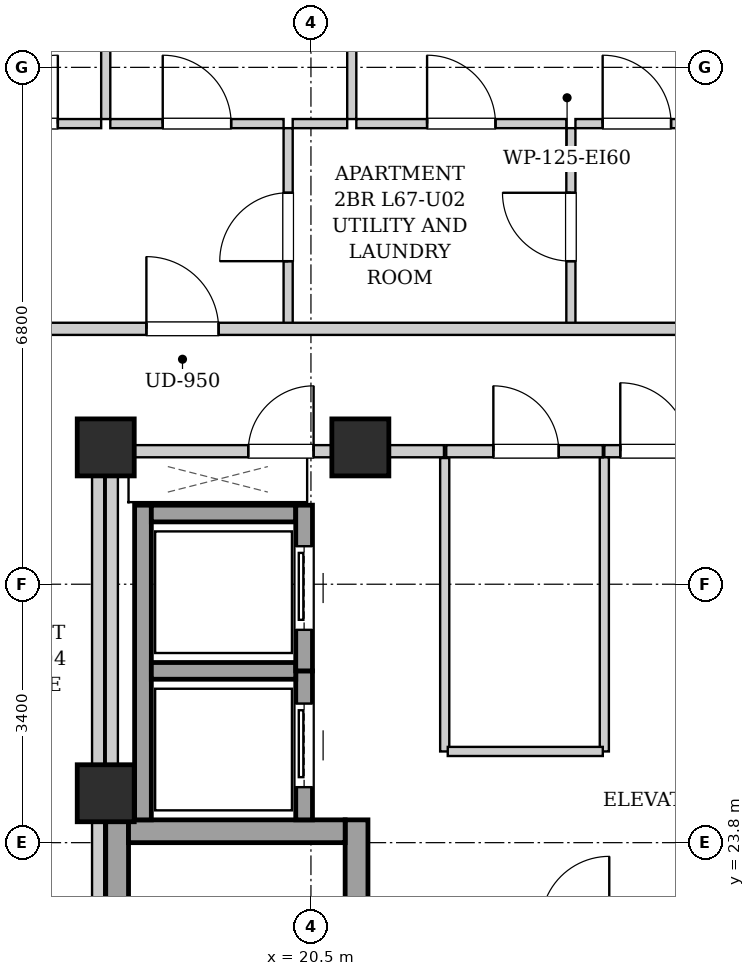
"""IFC4 building model, lengths in metres.
Left out: names, types, materials, properties, quantities, classifications, styles, units other than length and angle.
Written with IfcOpenShell. Run it as: python <this file> out.ifc"""

import sys

from ifc_helpers import new_model, si_unit, direction, frame, frame_2d, origin, origin_2d, place, context, subcontext, project, spatial, rectangle, extrude, element, fill, save


model = new_model("IFC4")
c1 = context("Model", 3, precision=1e-05, world=origin(), true_north=direction((0.0, 1.0)))
c2 = subcontext(c1, "Body", "Model", "MODEL_VIEW")
j1 = project(units=[si_unit("LENGTHUNIT", "METRE"), si_unit("PLANEANGLEUNIT", "RADIAN")], contexts=[c1])
p1 = place(None, origin())
s1 = spatial("IfcSite", under=j1, at=p1, CompositionType="ELEMENT")
p2 = place(p1, origin())
s2 = spatial("IfcBuilding", under=s1, at=p2, CompositionType="ELEMENT")
p3 = place(p2, frame((0.0, 0.0, 230.9)))
s3 = spatial("IfcBuildingStorey", under=s2, at=p3, CompositionType="ELEMENT", Elevation=230.9)
for number, where, z_axis, x_axis in (
    (1, (17.8, 29.0, 0.0), (0.0, 0.0, 1.0), (1.0, 0.0, 0.0)),
    (2, (21.15, 29.0, 0.0), (0.0, 0.0, 1.0), (1.0, 0.0, 0.0)),
    (3, (17.8, 24.45, 0.0), (0.0, 0.0, 1.0), (1.0, 0.0, 0.0)),
):
    element("IfcColumn", number, at=place(p3, frame(where, z_axis=z_axis, x_axis=x_axis)), inside=s3, PredefinedType="COLUMN", context=c2, shape_type="SweptSolid", body=[
        extrude(rectangle(XDim=0.75, YDim=0.75, at=origin_2d()), origin(), (0.0, 0.0, 1.0), 3.4),
    ])
for number, where, z_axis, x_axis in (
    (4, (17.95, 15.1, 0.0), (0.0, 0.0, 1.0), (0.0, 1.0, 0.0)),
    (5, (21.1, 15.1, 0.0), (0.0, 0.0, 1.0), (0.0, 1.0, 0.0)),
):
    element("IfcWall", number, at=place(p3, frame(where, z_axis=z_axis, x_axis=x_axis)), inside=s3, PredefinedType="SHEAR", context=c2, shape_type="SweptSolid", body=[
        extrude(rectangle(XDim=9.0, YDim=0.3, at=frame_2d((4.5, 0.0))), origin(), (0.0, 0.0, 1.0), 3.14),
    ])
p4 = place(p3, frame((18.1, 23.95, 0.0), z_axis=(0.0, 0.0, 1.0), x_axis=(1.0, 0.0, 0.0)))
e6 = element("IfcWall", 6, at=p4, inside=s3, PredefinedType="SHEAR", context=c2, shape_type="SweptSolid", body=[
    extrude(rectangle(XDim=2.85, YDim=0.3, at=frame_2d((1.425, 0.0))), origin(), (0.0, 0.0, 1.0), 3.14),
])
p5 = place(p3, frame((18.29, 24.1, 0.0), z_axis=(0.0, 0.0, 1.0), x_axis=(0.0, 1.0, 0.0)))
e7 = element("IfcWall", 7, at=p5, inside=s3, PredefinedType="SHEAR", context=c2, shape_type="SweptSolid", body=[
    extrude(rectangle(XDim=4.14, YDim=0.22, at=frame_2d((2.07, 0.0))), origin(), (0.0, 0.0, 1.0), 3.14),
])
p6 = place(p3, frame((20.41, 24.1, 0.0), z_axis=(0.0, 0.0, 1.0), x_axis=(0.0, 1.0, 0.0)))
e8 = element("IfcWall", 8, at=p6, inside=s3, PredefinedType="SHEAR", context=c2, shape_type="SweptSolid", body=[
    extrude(rectangle(XDim=1.96, YDim=0.22, at=frame_2d((0.98, 0.0))), origin(), (0.0, 0.0, 1.0), 3.14),
])
p7 = place(p6, frame((0.43, 0.0, 0.0)))
e9 = element("IfcOpeningElement", 9, at=p7, cuts=e8, PredefinedType="OPENING", context=c2, shape_type="SweptSolid", body=[
    extrude(rectangle(XDim=1.1, YDim=2.15, at=frame_2d((0.55, 1.075))), frame((0.0, 0.12, 0.0), z_axis=(0.0, -1.0, 0.0), x_axis=(1.0, 0.0, 0.0)), (0.0, 0.0, 1.0), 0.24),
])
for number, where, z_axis, x_axis in (
    (10, (18.4, 26.06, 0.0), (0.0, 0.0, 1.0), (1.0, 0.0, 0.0)),
    (11, (18.4, 28.13, 0.0), (0.0, 0.0, 1.0), (1.0, 0.0, 0.0)),
):
    element("IfcWall", number, at=place(p3, frame(where, z_axis=z_axis, x_axis=x_axis)), inside=s3, PredefinedType="SHEAR", context=c2, shape_type="SweptSolid", body=[
        extrude(rectangle(XDim=1.9, YDim=0.22, at=frame_2d((0.95, 0.0))), origin(), (0.0, 0.0, 1.0), 3.14),
    ])
p8 = place(p3, frame((20.41, 26.06, 0.0), z_axis=(0.0, 0.0, 1.0), x_axis=(0.0, 1.0, 0.0)))
e12 = element("IfcWall", 12, at=p8, inside=s3, PredefinedType="SHEAR", context=c2, shape_type="SweptSolid", body=[
    extrude(rectangle(XDim=2.18, YDim=0.22, at=frame_2d((1.09, 0.0))), origin(), (0.0, 0.0, 1.0), 3.14),
])
p9 = place(p8, frame((0.54, 0.0, 0.0)))
e13 = element("IfcOpeningElement", 13, at=p9, cuts=e12, PredefinedType="OPENING", context=c2, shape_type="SweptSolid", body=[
    extrude(rectangle(XDim=1.1, YDim=2.15, at=frame_2d((0.55, 1.075))), frame((0.0, 0.12, 0.0), z_axis=(0.0, -1.0, 0.0), x_axis=(1.0, 0.0, 0.0)), (0.0, 0.0, 1.0), 0.24),
])
p10 = place(p3, frame((17.88, 24.12, 0.0), z_axis=(0.0, 0.0, 1.0), x_axis=(0.0, 1.0, 0.0)))
e14 = element("IfcWall", 14, at=p10, inside=s3, PredefinedType="PARTITIONING", context=c2, shape_type="SweptSolid", body=[
    extrude(rectangle(XDim=4.76, YDim=0.16, at=frame_2d((2.38, 0.0))), origin(), (0.0, 0.0, 1.0), 3.14),
])
p11 = place(p3, frame((24.36, 28.95, 0.0), z_axis=(0.0, 0.0, 1.0), x_axis=(1.0, 0.0, 0.0)))
e15 = element("IfcWall", 15, at=p11, inside=s3, PredefinedType="PARTITIONING", context=c2, shape_type="SweptSolid", body=[
    extrude(rectangle(XDim=1.32, YDim=0.16, at=frame_2d((0.66, 0.0))), origin(), (0.0, 0.0, 1.0), 2.668),
])
p12 = place(p11, frame((0.21, 0.0, 0.0)))
e16 = element("IfcOpeningElement", 16, at=p12, cuts=e15, PredefinedType="OPENING", context=c2, shape_type="SweptSolid", body=[
    extrude(rectangle(XDim=0.9, YDim=2.05, at=frame_2d((0.45, 1.025))), frame((0.0, 0.09, 0.0), z_axis=(0.0, -1.0, 0.0), x_axis=(1.0, 0.0, 0.0)), (0.0, 0.0, 1.0), 0.18),
])
p13 = place(p3, frame((17.96, 28.95, 0.0), z_axis=(0.0, 0.0, 1.0), x_axis=(1.0, 0.0, 0.0)))
e17 = element("IfcWall", 17, at=p13, inside=s3, PredefinedType="PARTITIONING", context=c2, shape_type="SweptSolid", body=[
    extrude(rectangle(XDim=4.29, YDim=0.16, at=frame_2d((2.145, 0.0))), origin(), (0.0, 0.0, 1.0), 2.668),
])
p14 = place(p13, frame((1.715, 0.0, 0.0)))
e18 = element("IfcOpeningElement", 18, at=p14, cuts=e17, PredefinedType="OPENING", context=c2, shape_type="SweptSolid", body=[
    extrude(rectangle(XDim=0.86, YDim=2.05, at=frame_2d((0.43, 1.025))), frame((0.0, 0.09, 0.0), z_axis=(0.0, -1.0, 0.0), x_axis=(1.0, 0.0, 0.0)), (0.0, 0.0, 1.0), 0.18),
])
p15 = place(p3, frame((24.36, 25.0, 0.0), z_axis=(0.0, 0.0, 1.0), x_axis=(0.0, 1.0, 0.0)))
e19 = element("IfcWall", 19, at=p15, inside=s3, PredefinedType="PARTITIONING", context=c2, shape_type="SweptSolid", body=[
    extrude(rectangle(XDim=3.87, YDim=0.12, at=frame_2d((1.935, 0.0))), origin(), (0.0, 0.0, 1.0), 3.14),
])
p16 = place(p3, frame((22.26, 25.0, 0.0), z_axis=(0.0, 0.0, 1.0), x_axis=(0.0, 1.0, 0.0)))
e20 = element("IfcWall", 20, at=p16, inside=s3, PredefinedType="PARTITIONING", context=c2, shape_type="SweptSolid", body=[
    extrude(rectangle(XDim=3.86, YDim=0.12, at=frame_2d((1.93, 0.0))), origin(), (0.0, 0.0, 1.0), 3.14),
])
p17 = place(p3, frame((22.3, 25.0, 0.0), z_axis=(0.0, 0.0, 1.0), x_axis=(1.0, 0.0, 0.0)))
e21 = element("IfcWall", 21, at=p17, inside=s3, PredefinedType="PARTITIONING", context=c2, shape_type="SweptSolid", body=[
    extrude(rectangle(XDim=2.04, YDim=0.12, at=frame_2d((1.02, 0.0))), origin(), (0.0, 0.0, 1.0), 3.14),
])
p18 = place(p3, frame((22.28, 28.95, 0.0), z_axis=(0.0, 0.0, 1.0), x_axis=(1.0, 0.0, 0.0)))
e22 = element("IfcWall", 22, at=p18, inside=s3, PredefinedType="PARTITIONING", context=c2, shape_type="SweptSolid", body=[
    extrude(rectangle(XDim=2.06, YDim=0.16, at=frame_2d((1.03, 0.0))), origin(), (0.0, 0.0, 1.0), 2.668),
])
p19 = place(p18, frame((0.62, 0.0, 0.0)))
e23 = element("IfcOpeningElement", 23, at=p19, cuts=e22, PredefinedType="OPENING", context=c2, shape_type="SweptSolid", body=[
    extrude(rectangle(XDim=0.86, YDim=2.05, at=frame_2d((0.43, 1.025))), frame((0.0, 0.09, 0.0), z_axis=(0.0, -1.0, 0.0), x_axis=(1.0, 0.0, 0.0)), (0.0, 0.0, 1.0), 0.18),
])
p20 = place(p3, frame((20.2, 30.6, 0.0), z_axis=(0.0, 0.0, 1.0), x_axis=(0.0, 1.0, 0.0)))
e24 = element("IfcWall", 24, at=p20, inside=s3, PredefinedType="PARTITIONING", context=c2, shape_type="SweptSolid", body=[
    extrude(rectangle(XDim=2.6, YDim=0.12, at=frame_2d((1.3, 0.0))), origin(), (0.0, 0.0, 1.0), 3.14),
])
p21 = place(p20, frame((0.85, 0.0, 0.0)))
e25 = element("IfcOpeningElement", 25, at=p21, cuts=e24, PredefinedType="OPENING", context=c2, shape_type="SweptSolid", body=[
    extrude(rectangle(XDim=0.9, YDim=2.05, at=frame_2d((0.45, 1.025))), frame((0.0, 0.07, 0.0), z_axis=(0.0, -1.0, 0.0), x_axis=(1.0, 0.0, 0.0)), (0.0, 0.0, 1.0), 0.14),
])
p22 = place(p3, frame((15.7, 33.26, 0.0), z_axis=(0.0, 0.0, 1.0), x_axis=(1.0, 0.0, 0.0)))
e26 = element("IfcWall", 26, at=p22, inside=s3, PredefinedType="PARTITIONING", context=c2, shape_type="SweptSolid", body=[
    extrude(rectangle(XDim=2.04, YDim=0.12, at=frame_2d((1.02, 0.0))), origin(), (0.0, 0.0, 1.0), 3.14),
])
p23 = place(p22, frame((0.57, 0.0, 0.0)))
e27 = element("IfcOpeningElement", 27, at=p23, cuts=e26, PredefinedType="OPENING", context=c2, shape_type="SweptSolid", body=[
    extrude(rectangle(XDim=0.9, YDim=2.05, at=frame_2d((0.45, 1.025))), frame((0.0, 0.07, 0.0), z_axis=(0.0, -1.0, 0.0), x_axis=(1.0, 0.0, 0.0)), (0.0, 0.0, 1.0), 0.14),
])
p24 = place(p3, frame((17.86, 33.26, 0.0), z_axis=(0.0, 0.0, 1.0), x_axis=(1.0, 0.0, 0.0)))
e28 = element("IfcWall", 28, at=p24, inside=s3, PredefinedType="PARTITIONING", context=c2, shape_type="SweptSolid", body=[
    extrude(rectangle(XDim=2.28, YDim=0.12, at=frame_2d((1.14, 0.0))), origin(), (0.0, 0.0, 1.0), 3.14),
])
p25 = place(p24, frame((0.69, 0.0, 0.0)))
e29 = element("IfcOpeningElement", 29, at=p25, cuts=e28, PredefinedType="OPENING", context=c2, shape_type="SweptSolid", body=[
    extrude(rectangle(XDim=0.9, YDim=2.05, at=frame_2d((0.45, 1.025))), frame((0.0, 0.07, 0.0), z_axis=(0.0, -1.0, 0.0), x_axis=(1.0, 0.0, 0.0)), (0.0, 0.0, 1.0), 0.14),
])
p26 = place(p3, frame((23.92, 30.6, 0.0), z_axis=(0.0, 0.0, 1.0), x_axis=(0.0, 1.0, 0.0)))
e30 = element("IfcWall", 30, at=p26, inside=s3, PredefinedType="PARTITIONING", context=c2, shape_type="SweptSolid", body=[
    extrude(rectangle(XDim=2.6, YDim=0.12, at=frame_2d((1.3, 0.0))), origin(), (0.0, 0.0, 1.0), 3.14),
])
p27 = place(p26, frame((0.85, 0.0, 0.0)))
e31 = element("IfcOpeningElement", 31, at=p27, cuts=e30, PredefinedType="OPENING", context=c2, shape_type="SweptSolid", body=[
    extrude(rectangle(XDim=0.9, YDim=2.05, at=frame_2d((0.45, 1.025))), frame((0.0, 0.07, 0.0), z_axis=(0.0, -1.0, 0.0), x_axis=(1.0, 0.0, 0.0)), (0.0, 0.0, 1.0), 0.14),
])
p28 = place(p3, frame((20.26, 33.26, 0.0), z_axis=(0.0, 0.0, 1.0), x_axis=(1.0, 0.0, 0.0)))
e32 = element("IfcWall", 32, at=p28, inside=s3, PredefinedType="PARTITIONING", context=c2, shape_type="SweptSolid", body=[
    extrude(rectangle(XDim=0.717, YDim=0.12, at=frame_2d((0.358, 0.0))), origin(), (0.0, 0.0, 1.0), 3.14),
])
p29 = place(p3, frame((21.097, 33.26, 0.0), z_axis=(0.0, 0.0, 1.0), x_axis=(1.0, 0.0, 0.0)))
e33 = element("IfcWall", 33, at=p29, inside=s3, PredefinedType="PARTITIONING", context=c2, shape_type="SweptSolid", body=[
    extrude(rectangle(XDim=2.763, YDim=0.12, at=frame_2d((1.382, 0.0))), origin(), (0.0, 0.0, 1.0), 3.14),
])
p30 = place(p29, frame((0.931, 0.0, 0.0)))
e34 = element("IfcOpeningElement", 34, at=p30, cuts=e33, PredefinedType="OPENING", context=c2, shape_type="SweptSolid", body=[
    extrude(rectangle(XDim=0.9, YDim=2.05, at=frame_2d((0.45, 1.025))), frame((0.0, 0.07, 0.0), z_axis=(0.0, -1.0, 0.0), x_axis=(1.0, 0.0, 0.0)), (0.0, 0.0, 1.0), 0.14),
])
p31 = place(p3, frame((23.98, 33.26, 0.0), z_axis=(0.0, 0.0, 1.0), x_axis=(1.0, 0.0, 0.0)))
e35 = element("IfcWall", 35, at=p31, inside=s3, PredefinedType="PARTITIONING", context=c2, shape_type="SweptSolid", body=[
    extrude(rectangle(XDim=1.617, YDim=0.12, at=frame_2d((0.809, 0.0))), origin(), (0.0, 0.0, 1.0), 3.14),
])
p32 = place(p31, frame((0.358, 0.0, 0.0)))
e36 = element("IfcOpeningElement", 36, at=p32, cuts=e35, PredefinedType="OPENING", context=c2, shape_type="SweptSolid", body=[
    extrude(rectangle(XDim=0.9, YDim=2.05, at=frame_2d((0.45, 1.025))), frame((0.0, 0.07, 0.0), z_axis=(0.0, -1.0, 0.0), x_axis=(1.0, 0.0, 0.0)), (0.0, 0.0, 1.0), 0.14),
])
p33 = place(p3, frame((17.8, 33.32, 0.0), z_axis=(0.0, 0.0, 1.0), x_axis=(0.0, 1.0, 0.0)))
e37 = element("IfcWall", 37, at=p33, inside=s3, PredefinedType="PARTITIONING", context=c2, shape_type="SweptSolid", body=[
    extrude(rectangle(XDim=6.6, YDim=0.12, at=frame_2d((3.3, 0.0))), origin(), (0.0, 0.0, 1.0), 2.668),
])
p34 = place(p33, frame((2.835, 0.0, 0.0)))
e38 = element("IfcOpeningElement", 38, at=p34, cuts=e37, PredefinedType="OPENING", context=c2, shape_type="SweptSolid", body=[
    extrude(rectangle(XDim=0.9, YDim=2.05, at=frame_2d((0.45, 1.025))), frame((0.0, 0.07, 0.0), z_axis=(0.0, -1.0, 0.0), x_axis=(1.0, 0.0, 0.0)), (0.0, 0.0, 1.0), 0.14),
])
p35 = place(p3, frame((21.037, 33.32, 0.0), z_axis=(0.0, 0.0, 1.0), x_axis=(0.0, 1.0, 0.0)))
e39 = element("IfcWall", 39, at=p35, inside=s3, PredefinedType="PARTITIONING", context=c2, shape_type="SweptSolid", body=[
    extrude(rectangle(XDim=6.6, YDim=0.12, at=frame_2d((3.3, 0.0))), origin(), (0.0, 0.0, 1.0), 3.14),
])
p36 = place(p35, frame((2.835, 0.0, 0.0)))
e40 = element("IfcOpeningElement", 40, at=p36, cuts=e39, PredefinedType="OPENING", context=c2, shape_type="SweptSolid", body=[
    extrude(rectangle(XDim=0.9, YDim=2.05, at=frame_2d((0.45, 1.025))), frame((0.0, 0.07, 0.0), z_axis=(0.0, -1.0, 0.0), x_axis=(1.0, 0.0, 0.0)), (0.0, 0.0, 1.0), 0.14),
])
p37 = place(p3, frame((13.15, 30.56, 0.0), z_axis=(0.0, 0.0, 1.0), x_axis=(1.0, 0.0, 0.0)))
e41 = element("IfcWall", 41, at=p37, inside=s3, PredefinedType="PARTITIONING", context=c2, shape_type="SweptSolid", body=[
    extrude(rectangle(XDim=24.6, YDim=0.16, at=frame_2d((12.3, 0.0))), origin(), (0.0, 0.0, 1.0), 3.14),
])
p38 = place(p37, frame((5.185, 0.0, 0.0)))
e42 = element("IfcOpeningElement", 42, at=p38, cuts=e41, PredefinedType="OPENING", context=c2, shape_type="SweptSolid", body=[
    extrude(rectangle(XDim=0.95, YDim=2.1, at=frame_2d((0.475, 1.05))), frame((0.0, 0.09, 0.0), z_axis=(0.0, -1.0, 0.0), x_axis=(1.0, 0.0, 0.0)), (0.0, 0.0, 1.0), 0.18),
])
p39 = place(p37, frame((21.55, 0.0, 0.0)))
e43 = element("IfcOpeningElement", 43, at=p39, cuts=e41, PredefinedType="OPENING", context=c2, shape_type="SweptSolid", body=[
    extrude(rectangle(XDim=0.95, YDim=2.1, at=frame_2d((0.475, 1.05))), frame((0.0, 0.09, 0.0), z_axis=(0.0, -1.0, 0.0), x_axis=(1.0, 0.0, 0.0)), (0.0, 0.0, 1.0), 0.18),
])
p40 = place(p3, frame((17.7, 15.02, 0.0), z_axis=(0.0, 0.0, 1.0), x_axis=(0.0, 1.0, 0.0)))
e44 = element("IfcWall", 44, at=p40, inside=s3, PredefinedType="PARTITIONING", context=c2, shape_type="SweptSolid", body=[
    extrude(rectangle(XDim=13.98, YDim=0.16, at=frame_2d((6.99, 0.0))), origin(), (0.0, 0.0, 1.0), 3.14),
])
p41 = place(p7, origin())
e45 = element("IfcDoor", 45, at=p41, inside=s3, OperationType="SLIDING_TO_LEFT", PredefinedType="DOOR", context=c2, shape_type="SweptSolid", body=[
    extrude(rectangle(XDim=1.1, YDim=2.15, at=frame_2d((0.55, 1.075))), frame((0.0, 0.025, 0.0), z_axis=(0.0, -1.0, 0.0), x_axis=(1.0, 0.0, 0.0)), (0.0, 0.0, 1.0), 0.05),
])
fill(e9, e45)
p42 = place(p9, origin())
e46 = element("IfcDoor", 46, at=p42, inside=s3, OperationType="SLIDING_TO_LEFT", PredefinedType="DOOR", context=c2, shape_type="SweptSolid", body=[
    extrude(rectangle(XDim=1.1, YDim=2.15, at=frame_2d((0.55, 1.075))), frame((0.0, 0.025, 0.0), z_axis=(0.0, -1.0, 0.0), x_axis=(1.0, 0.0, 0.0)), (0.0, 0.0, 1.0), 0.05),
])
fill(e13, e46)
p43 = place(p12, origin())
e47 = element("IfcDoor", 47, at=p43, inside=s3, OperationType="SINGLE_SWING_LEFT", PredefinedType="DOOR", context=c2, shape_type="SweptSolid", body=[
    extrude(rectangle(XDim=0.9, YDim=2.05, at=frame_2d((0.45, 1.025))), frame((0.0, 0.025, 0.0), z_axis=(0.0, -1.0, 0.0), x_axis=(1.0, 0.0, 0.0)), (0.0, 0.0, 1.0), 0.05),
])
fill(e16, e47)
p44 = place(p14, origin())
e48 = element("IfcDoor", 48, at=p44, inside=s3, OperationType="SINGLE_SWING_RIGHT", PredefinedType="DOOR", context=c2, shape_type="SweptSolid", body=[
    extrude(rectangle(XDim=0.86, YDim=2.05, at=frame_2d((0.43, 1.025))), frame((0.0, 0.025, 0.0), z_axis=(0.0, -1.0, 0.0), x_axis=(1.0, 0.0, 0.0)), (0.0, 0.0, 1.0), 0.05),
])
fill(e18, e48)
p45 = place(p19, origin())
e49 = element("IfcDoor", 49, at=p45, inside=s3, OperationType="SINGLE_SWING_LEFT", PredefinedType="DOOR", context=c2, shape_type="SweptSolid", body=[
    extrude(rectangle(XDim=0.86, YDim=2.05, at=frame_2d((0.43, 1.025))), frame((0.0, 0.025, 0.0), z_axis=(0.0, -1.0, 0.0), x_axis=(1.0, 0.0, 0.0)), (0.0, 0.0, 1.0), 0.05),
])
fill(e23, e49)
p46 = place(p21, origin())
e50 = element("IfcDoor", 50, at=p46, inside=s3, OperationType="SINGLE_SWING_LEFT", PredefinedType="DOOR", context=c2, shape_type="SweptSolid", body=[
    extrude(rectangle(XDim=0.9, YDim=2.05, at=frame_2d((0.45, 1.025))), frame((0.0, 0.025, 0.0), z_axis=(0.0, -1.0, 0.0), x_axis=(1.0, 0.0, 0.0)), (0.0, 0.0, 1.0), 0.05),
])
fill(e25, e50)
p47 = place(p23, origin())
e51 = element("IfcDoor", 51, at=p47, inside=s3, OperationType="SINGLE_SWING_RIGHT", PredefinedType="DOOR", context=c2, shape_type="SweptSolid", body=[
    extrude(rectangle(XDim=0.9, YDim=2.05, at=frame_2d((0.45, 1.025))), frame((0.0, 0.025, 0.0), z_axis=(0.0, -1.0, 0.0), x_axis=(1.0, 0.0, 0.0)), (0.0, 0.0, 1.0), 0.05),
])
fill(e27, e51)
p48 = place(p25, origin())
e52 = element("IfcDoor", 52, at=p48, inside=s3, OperationType="SINGLE_SWING_LEFT", PredefinedType="DOOR", context=c2, shape_type="SweptSolid", body=[
    extrude(rectangle(XDim=0.9, YDim=2.05, at=frame_2d((0.45, 1.025))), frame((0.0, 0.025, 0.0), z_axis=(0.0, -1.0, 0.0), x_axis=(1.0, 0.0, 0.0)), (0.0, 0.0, 1.0), 0.05),
])
fill(e29, e52)
p49 = place(p27, origin())
e53 = element("IfcDoor", 53, at=p49, inside=s3, OperationType="SINGLE_SWING_RIGHT", PredefinedType="DOOR", context=c2, shape_type="SweptSolid", body=[
    extrude(rectangle(XDim=0.9, YDim=2.05, at=frame_2d((0.45, 1.025))), frame((0.0, 0.025, 0.0), z_axis=(0.0, -1.0, 0.0), x_axis=(1.0, 0.0, 0.0)), (0.0, 0.0, 1.0), 0.05),
])
fill(e31, e53)
p50 = place(p30, origin())
e54 = element("IfcDoor", 54, at=p50, inside=s3, OperationType="SINGLE_SWING_LEFT", PredefinedType="DOOR", context=c2, shape_type="SweptSolid", body=[
    extrude(rectangle(XDim=0.9, YDim=2.05, at=frame_2d((0.45, 1.025))), frame((0.0, 0.025, 0.0), z_axis=(0.0, -1.0, 0.0), x_axis=(1.0, 0.0, 0.0)), (0.0, 0.0, 1.0), 0.05),
])
fill(e34, e54)
p51 = place(p32, origin())
e55 = element("IfcDoor", 55, at=p51, inside=s3, OperationType="SINGLE_SWING_LEFT", PredefinedType="DOOR", context=c2, shape_type="SweptSolid", body=[
    extrude(rectangle(XDim=0.9, YDim=2.05, at=frame_2d((0.45, 1.025))), frame((0.0, 0.025, 0.0), z_axis=(0.0, -1.0, 0.0), x_axis=(1.0, 0.0, 0.0)), (0.0, 0.0, 1.0), 0.05),
])
fill(e36, e55)
p52 = place(p38, origin())
e56 = element("IfcDoor", 56, at=p52, inside=s3, OperationType="SINGLE_SWING_LEFT", PredefinedType="DOOR", context=c2, shape_type="SweptSolid", body=[
    extrude(rectangle(XDim=0.95, YDim=2.1, at=frame_2d((0.475, 1.05))), frame((0.0, 0.025, 0.0), z_axis=(0.0, -1.0, 0.0), x_axis=(1.0, 0.0, 0.0)), (0.0, 0.0, 1.0), 0.05),
])
fill(e42, e56)
save(model, sys.argv[1])
